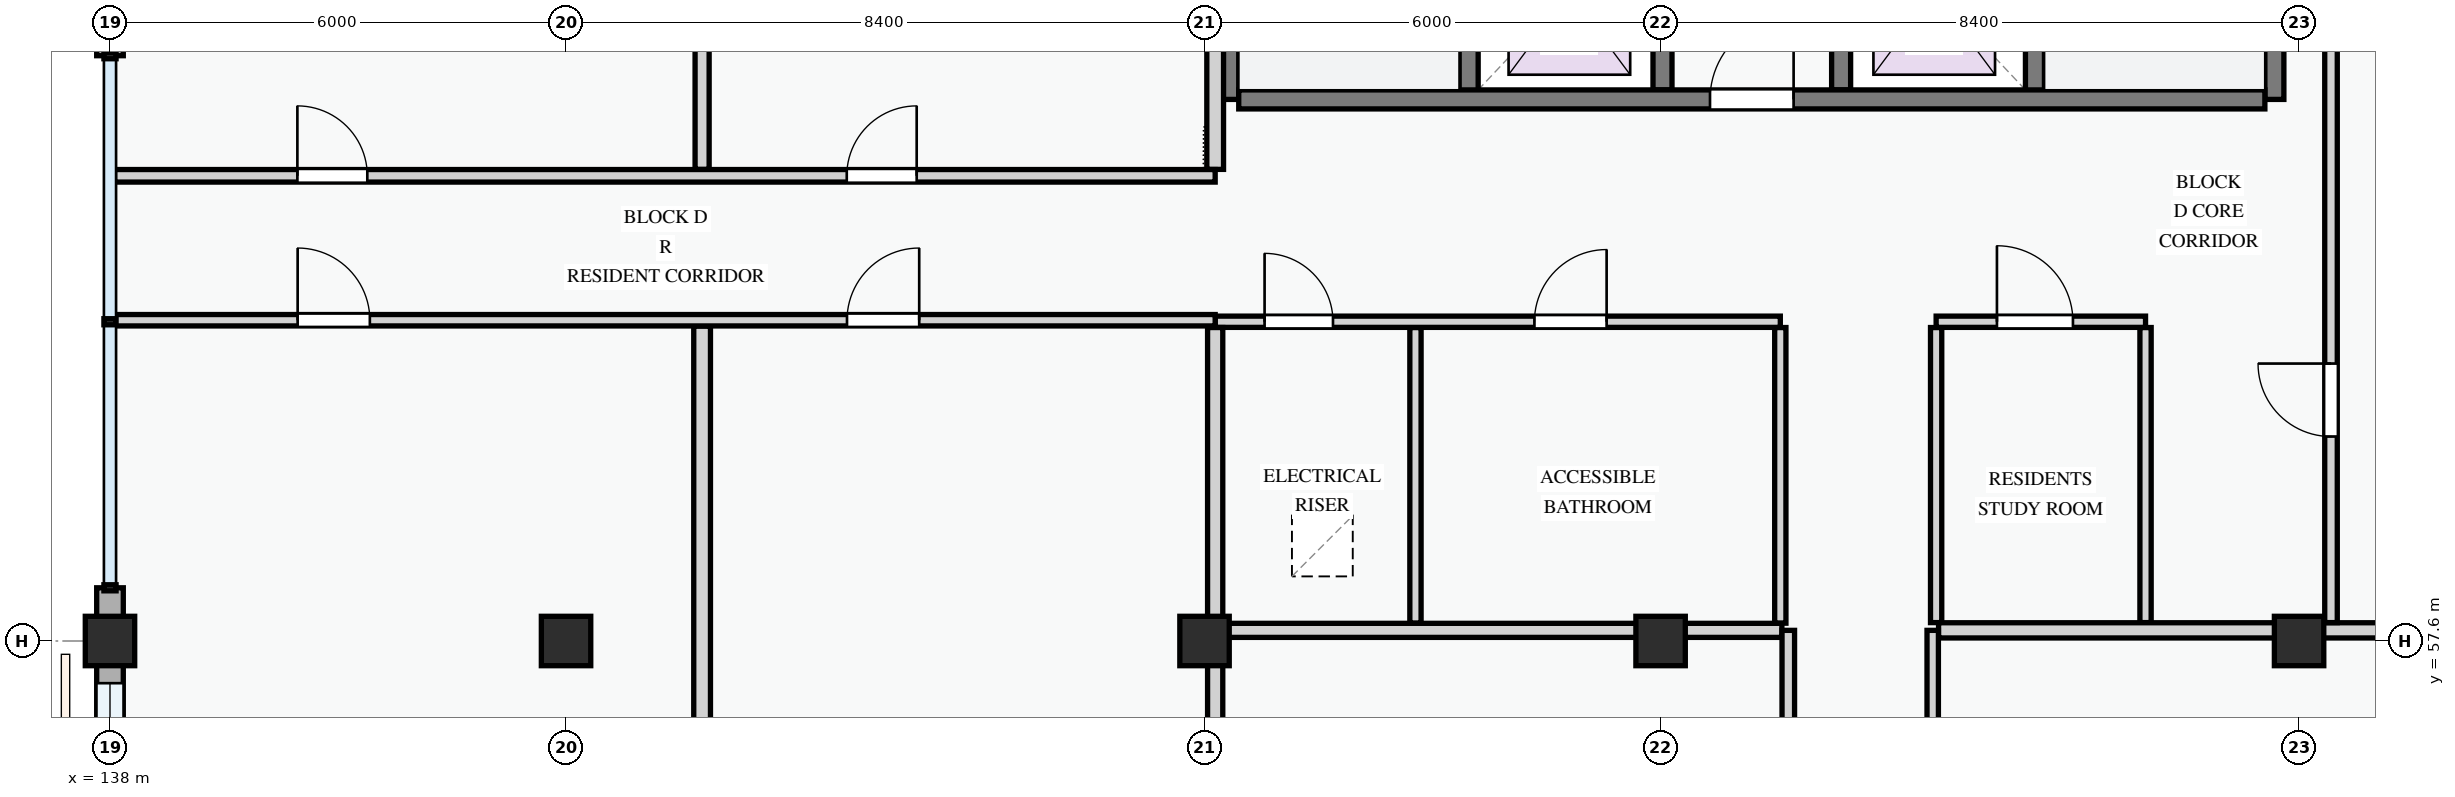
"""IFC4 building model, lengths in metres.
Left out: names, types, materials, properties, quantities, classifications, styles, units other than length and angle.
Written with IfcOpenShell. Run it as: python <this file> out.ifc"""

import sys

from ifc_helpers import new_model, si_unit, direction, frame, frame_2d, origin, origin_2d, place, context, subcontext, project, spatial, rectangle, extrude, element, fill, save


model = new_model("IFC4")
c1 = context("Model", 3, precision=1e-05, world=origin(), true_north=direction((0.0, 1.0)))
c2 = subcontext(c1, "Body", "Model", "MODEL_VIEW")
j1 = project(units=[si_unit("LENGTHUNIT", "METRE"), si_unit("PLANEANGLEUNIT", "RADIAN")], contexts=[c1])
p1 = place(None, origin())
s1 = spatial("IfcSite", under=j1, at=p1, CompositionType="ELEMENT")
p2 = place(p1, origin())
s2 = spatial("IfcBuilding", under=s1, at=p2, CompositionType="ELEMENT")
p3 = place(p2, frame((0.0, 0.0, 4.5)))
s3 = spatial("IfcBuildingStorey", under=s2, at=p3, CompositionType="ELEMENT", Elevation=4.5)
for number, where, z_axis, x_axis in (
    (1, (138.0, 57.6, 0.0), (0.0, 0.0, 1.0), (1.0, 0.0, 0.0)),
    (2, (144.0, 57.6, 0.0), (0.0, 0.0, 1.0), (1.0, 0.0, 0.0)),
    (3, (152.4, 57.6, 0.0), (0.0, 0.0, 1.0), (1.0, 0.0, 0.0)),
    (4, (158.4, 57.6, 0.0), (0.0, 0.0, 1.0), (1.0, 0.0, 0.0)),
    (5, (166.8, 57.6, 0.0), (0.0, 0.0, 1.0), (1.0, 0.0, 0.0)),
):
    element("IfcColumn", number, at=place(p3, frame(where, z_axis=z_axis, x_axis=x_axis)), inside=s3, PredefinedType="COLUMN", context=c2, shape_type="SweptSolid", body=[
        extrude(rectangle(XDim=0.65, YDim=0.65, at=origin_2d()), origin(), (0.0, 0.0, 1.0), 3.6),
    ])
for number, where, z_axis, x_axis in (
    (6, (138.0, 66.0, 0.0), (0.0, 0.0, 1.0), (0.0, -1.0, 0.0)),
    (7, (138.0, 58.3, 0.0), (0.0, 0.0, 1.0), (0.0, -1.0, 0.0)),
):
    element("IfcWall", number, at=place(p3, frame(where, z_axis=z_axis, x_axis=x_axis)), inside=s3, PredefinedType="STANDARD", context=c2, shape_type="SweptSolid", body=[
        extrude(rectangle(XDim=0.7, YDim=0.35, at=frame_2d((0.35, 0.0))), origin(), (0.0, 0.0, 1.0), 2.725),
    ])
p4 = place(p3, frame((138.0, 57.6, 0.0), z_axis=(0.0, 0.0, 1.0), x_axis=(0.0, -1.0, 0.0)))
e8 = element("IfcWall", 8, at=p4, inside=s3, PredefinedType="STANDARD", context=c2, shape_type="SweptSolid", body=[
    extrude(rectangle(XDim=6.0, YDim=0.35, at=frame_2d((3.0, 0.0))), origin(), (0.0, 0.0, 1.0), 2.875),
])
p5 = place(p4, frame((0.555, 0.0, 0.78)))
e9 = element("IfcOpeningElement", 9, at=p5, cuts=e8, PredefinedType="OPENING", context=c2, shape_type="SweptSolid", body=[
    extrude(rectangle(XDim=2.15, YDim=1.65, at=frame_2d((1.075, 0.825))), frame((0.0, 0.185, 0.0), z_axis=(0.0, -1.0, 0.0), x_axis=(1.0, 0.0, 0.0)), (0.0, 0.0, 1.0), 0.37),
])
p6 = place(p4, frame((3.795, 0.0, 0.78)))
e10 = element("IfcOpeningElement", 10, at=p6, cuts=e8, PredefinedType="OPENING", context=c2, shape_type="SweptSolid", body=[
    extrude(rectangle(XDim=1.15, YDim=1.25, at=frame_2d((0.575, 0.625))), frame((0.0, 0.185, 0.0), z_axis=(0.0, -1.0, 0.0), x_axis=(1.0, 0.0, 0.0)), (0.0, 0.0, 1.0), 0.37),
])
p7 = place(p3, frame((155.875, 71.65, 0.0), z_axis=(0.0, 0.0, 1.0), x_axis=(0.0, -1.0, 0.0)))
e11 = element("IfcWall", 11, at=p7, inside=s3, PredefinedType="SHEAR", context=c2, shape_type="SweptSolid", body=[
    extrude(rectangle(XDim=6.925, YDim=0.25, at=frame_2d((3.462, 0.0))), origin(), (0.0, 0.0, 1.0), 3.3),
])
p8 = place(p7, frame((0.35, 0.0, 0.0)))
e12 = element("IfcOpeningElement", 12, at=p8, cuts=e11, PredefinedType="OPENING", context=c2, shape_type="SweptSolid", body=[
    extrude(rectangle(XDim=0.95, YDim=2.1, at=frame_2d((0.475, 1.05))), frame((0.0, 0.135, 0.0), z_axis=(0.0, -1.0, 0.0), x_axis=(1.0, 0.0, 0.0)), (0.0, 0.0, 1.0), 0.27),
])
p9 = place(p3, frame((152.725, 71.8, 0.0), z_axis=(0.0, 0.0, 1.0), x_axis=(0.0, -1.0, 0.0)))
e13 = element("IfcWall", 13, at=p9, inside=s3, PredefinedType="SHEAR", context=c2, shape_type="SweptSolid", body=[
    extrude(rectangle(XDim=7.075, YDim=0.25, at=frame_2d((3.538, 0.0))), origin(), (0.0, 0.0, 1.0), 3.3),
])
p10 = place(p3, frame((166.475, 71.65, 0.0), z_axis=(0.0, 0.0, 1.0), x_axis=(0.0, -1.0, 0.0)))
e14 = element("IfcWall", 14, at=p10, inside=s3, PredefinedType="SHEAR", context=c2, shape_type="SweptSolid", body=[
    extrude(rectangle(XDim=6.925, YDim=0.25, at=frame_2d((3.462, 0.0))), origin(), (0.0, 0.0, 1.0), 3.3),
])
p11 = place(p3, frame((163.325, 71.65, 0.0), z_axis=(0.0, 0.0, 1.0), x_axis=(0.0, -1.0, 0.0)))
e15 = element("IfcWall", 15, at=p11, inside=s3, PredefinedType="SHEAR", context=c2, shape_type="SweptSolid", body=[
    extrude(rectangle(XDim=6.925, YDim=0.25, at=frame_2d((3.462, 0.0))), origin(), (0.0, 0.0, 1.0), 3.3),
])
p12 = place(p11, frame((0.35, 0.0, 0.0)))
e16 = element("IfcOpeningElement", 16, at=p12, cuts=e15, PredefinedType="OPENING", context=c2, shape_type="SweptSolid", body=[
    extrude(rectangle(XDim=0.95, YDim=2.1, at=frame_2d((0.475, 1.05))), frame((0.0, 0.135, 0.0), z_axis=(0.0, -1.0, 0.0), x_axis=(1.0, 0.0, 0.0)), (0.0, 0.0, 1.0), 0.27),
])
for number, where, z_axis, x_axis in (
    (17, (158.425, 67.275, 0.0), (0.0, 0.0, 1.0), (0.0, -1.0, 0.0)),
    (18, (160.775, 67.275, 0.0), (0.0, 0.0, 1.0), (0.0, -1.0, 0.0)),
):
    element("IfcWall", number, at=place(p3, frame(where, z_axis=z_axis, x_axis=x_axis)), inside=s3, PredefinedType="SHEAR", context=c2, shape_type="SweptSolid", body=[
        extrude(rectangle(XDim=2.425, YDim=0.25, at=frame_2d((1.212, 0.0))), origin(), (0.0, 0.0, 1.0), 3.3),
    ])
p13 = place(p3, frame((152.85, 64.725, 0.0), z_axis=(0.0, 0.0, 1.0), x_axis=(1.0, 0.0, 0.0)))
e19 = element("IfcWall", 19, at=p13, inside=s3, PredefinedType="SHEAR", context=c2, shape_type="SweptSolid", body=[
    extrude(rectangle(XDim=13.5, YDim=0.25, at=frame_2d((6.75, 0.0))), origin(), (0.0, 0.0, 1.0), 3.3),
])
p14 = place(p13, frame((6.2, 0.0, 0.0)))
e20 = element("IfcOpeningElement", 20, at=p14, cuts=e19, PredefinedType="OPENING", context=c2, shape_type="SweptSolid", body=[
    extrude(rectangle(XDim=1.1, YDim=2.15, at=frame_2d((0.55, 1.075))), frame((0.0, 0.135, 0.0), z_axis=(0.0, -1.0, 0.0), x_axis=(1.0, 0.0, 0.0)), (0.0, 0.0, 1.0), 0.27),
])
for number, where, z_axis, x_axis in (
    (21, (155.175, 61.724, 0.0), (0.0, 0.0, 1.0), (0.0, -1.0, 0.0)),
    (22, (159.975, 61.724, 0.0), (0.0, 0.0, 1.0), (0.0, -1.0, 0.0)),
):
    element("IfcWall", number, at=place(p3, frame(where, z_axis=z_axis, x_axis=x_axis)), inside=s3, PredefinedType="PARTITIONING", context=c2, shape_type="SweptSolid", body=[
        extrude(rectangle(XDim=3.89, YDim=0.148, at=frame_2d((1.945, 0.0))), origin(), (0.0, 0.0, 1.0), 3.3),
    ])
for number, where, z_axis, x_axis in (
    (23, (162.025, 61.724, 0.0), (0.0, 0.0, 1.0), (0.0, -1.0, 0.0)),
    (24, (164.78, 61.724, 0.0), (0.0, 0.0, 1.0), (0.0, -1.0, 0.0)),
):
    element("IfcWall", number, at=place(p3, frame(where, z_axis=z_axis, x_axis=x_axis)), inside=s3, PredefinedType="PARTITIONING", context=c2, shape_type="SweptSolid", body=[
        extrude(rectangle(XDim=3.882, YDim=0.148, at=frame_2d((1.941, 0.0))), origin(), (0.0, 0.0, 1.0), 3.3),
    ])
p15 = place(p3, frame((152.54, 61.8, 0.0), z_axis=(0.0, 0.0, 1.0), x_axis=(1.0, 0.0, 0.0)))
e25 = element("IfcWall", 25, at=p15, inside=s3, PredefinedType="PARTITIONING", context=c2, shape_type="SweptSolid", body=[
    extrude(rectangle(XDim=7.435, YDim=0.148, at=frame_2d((3.718, 0.0))), origin(), (0.0, 0.0, 1.0), 3.3),
])
p16 = place(p15, frame((0.65, 0.0, 0.0)))
e26 = element("IfcOpeningElement", 26, at=p16, cuts=e25, PredefinedType="OPENING", context=c2, shape_type="SweptSolid", body=[
    extrude(rectangle(XDim=0.9, YDim=2.1, at=frame_2d((0.45, 1.05))), frame((0.0, 0.084, 0.0), z_axis=(0.0, -1.0, 0.0), x_axis=(1.0, 0.0, 0.0)), (0.0, 0.0, 1.0), 0.168),
])
p17 = place(p15, frame((4.2, 0.0, 0.0)))
e27 = element("IfcOpeningElement", 27, at=p17, cuts=e25, PredefinedType="OPENING", context=c2, shape_type="SweptSolid", body=[
    extrude(rectangle(XDim=0.95, YDim=2.1, at=frame_2d((0.475, 1.05))), frame((0.0, 0.084, 0.0), z_axis=(0.0, -1.0, 0.0), x_axis=(1.0, 0.0, 0.0)), (0.0, 0.0, 1.0), 0.168),
])
p18 = place(p3, frame((162.025, 61.8, 0.0), z_axis=(0.0, 0.0, 1.0), x_axis=(1.0, 0.0, 0.0)))
e28 = element("IfcWall", 28, at=p18, inside=s3, PredefinedType="PARTITIONING", context=c2, shape_type="SweptSolid", body=[
    extrude(rectangle(XDim=2.755, YDim=0.148, at=frame_2d((1.377, 0.0))), origin(), (0.0, 0.0, 1.0), 3.3),
])
p19 = place(p18, frame((0.8, 0.0, 0.0)))
e29 = element("IfcOpeningElement", 29, at=p19, cuts=e28, PredefinedType="OPENING", context=c2, shape_type="SweptSolid", body=[
    extrude(rectangle(XDim=1.0, YDim=2.15, at=frame_2d((0.5, 1.075))), frame((0.0, 0.084, 0.0), z_axis=(0.0, -1.0, 0.0), x_axis=(1.0, 0.0, 0.0)), (0.0, 0.0, 1.0), 0.168),
])
p20 = place(p3, frame((152.642, 57.74, 0.0), z_axis=(0.0, 0.0, 1.0), x_axis=(1.0, 0.0, 0.0)))
e30 = element("IfcWall", 30, at=p20, inside=s3, PredefinedType="PARTITIONING", context=c2, shape_type="SweptSolid", body=[
    extrude(rectangle(XDim=7.354, YDim=0.185, at=frame_2d((3.677, 0.0))), origin(), (0.0, 0.0, 1.0), 2.675),
])
p21 = place(p3, frame((162.057, 57.74, 0.0), z_axis=(0.0, 0.0, 1.0), x_axis=(1.0, 0.0, 0.0)))
e31 = element("IfcWall", 31, at=p21, inside=s3, PredefinedType="PARTITIONING", context=c2, shape_type="SweptSolid", body=[
    extrude(rectangle(XDim=11.766, YDim=0.2, at=frame_2d((5.883, 0.0))), origin(), (0.0, 0.0, 1.0), 2.675),
])
p22 = place(p3, frame((160.08, 37.26, 0.0), z_axis=(0.0, 0.0, 1.0), x_axis=(0.0, 1.0, 0.0)))
e32 = element("IfcWall", 32, at=p22, inside=s3, PredefinedType="PARTITIONING", context=c2, shape_type="SweptSolid", body=[
    extrude(rectangle(XDim=20.48, YDim=0.165, at=frame_2d((10.24, 0.0))), origin(), (0.0, 0.0, 1.0), 3.3),
])
p23 = place(p22, frame((9.45, 0.0, 0.0)))
e33 = element("IfcOpeningElement", 33, at=p23, cuts=e32, PredefinedType="OPENING", context=c2, shape_type="SweptSolid", body=[
    extrude(rectangle(XDim=0.95, YDim=2.1, at=frame_2d((0.475, 1.05))), frame((0.0, 0.093, 0.0), z_axis=(0.0, -1.0, 0.0), x_axis=(1.0, 0.0, 0.0)), (0.0, 0.0, 1.0), 0.185),
])
p24 = place(p22, frame((10.9, 0.0, 0.0)))
e34 = element("IfcOpeningElement", 34, at=p24, cuts=e32, PredefinedType="OPENING", context=c2, shape_type="SweptSolid", body=[
    extrude(rectangle(XDim=0.95, YDim=2.1, at=frame_2d((0.475, 1.05))), frame((0.0, 0.093, 0.0), z_axis=(0.0, -1.0, 0.0), x_axis=(1.0, 0.0, 0.0)), (0.0, 0.0, 1.0), 0.185),
])
p25 = place(p3, frame((161.98, 37.26, 0.0), z_axis=(0.0, 0.0, 1.0), x_axis=(0.0, 1.0, 0.0)))
e35 = element("IfcWall", 35, at=p25, inside=s3, PredefinedType="PARTITIONING", context=c2, shape_type="SweptSolid", body=[
    extrude(rectangle(XDim=20.48, YDim=0.15, at=frame_2d((10.24, 0.0))), origin(), (0.0, 0.0, 1.0), 3.3),
])
p26 = place(p25, frame((9.44, 0.0, 0.0)))
e36 = element("IfcOpeningElement", 36, at=p26, cuts=e35, PredefinedType="OPENING", context=c2, shape_type="SweptSolid", body=[
    extrude(rectangle(XDim=0.92, YDim=2.1, at=frame_2d((0.46, 1.05))), frame((0.0, 0.085, 0.0), z_axis=(0.0, -1.0, 0.0), x_axis=(1.0, 0.0, 0.0)), (0.0, 0.0, 1.0), 0.17),
])
p27 = place(p25, frame((10.9, 0.0, 0.0)))
e37 = element("IfcOpeningElement", 37, at=p27, cuts=e35, PredefinedType="OPENING", context=c2, shape_type="SweptSolid", body=[
    extrude(rectangle(XDim=0.92, YDim=2.1, at=frame_2d((0.46, 1.05))), frame((0.0, 0.085, 0.0), z_axis=(0.0, -1.0, 0.0), x_axis=(1.0, 0.0, 0.0)), (0.0, 0.0, 1.0), 0.17),
])
p28 = place(p3, frame((167.22, 57.842, 0.0), z_axis=(0.0, 0.0, 1.0), x_axis=(0.0, 1.0, 0.0)))
e38 = element("IfcWall", 38, at=p28, inside=s3, PredefinedType="PARTITIONING", context=c2, shape_type="SweptSolid", body=[
    extrude(rectangle(XDim=13.981, YDim=0.165, at=frame_2d((6.99, 0.0))), origin(), (0.0, 0.0, 1.0), 2.725),
])
p29 = place(p28, frame((2.448, 0.0, 0.0)))
e39 = element("IfcOpeningElement", 39, at=p29, cuts=e38, PredefinedType="OPENING", context=c2, shape_type="SweptSolid", body=[
    extrude(rectangle(XDim=0.96, YDim=2.12, at=frame_2d((0.48, 1.06))), frame((0.0, 0.093, 0.0), z_axis=(0.0, -1.0, 0.0), x_axis=(1.0, 0.0, 0.0)), (0.0, 0.0, 1.0), 0.185),
])
p30 = place(p3, frame((145.79, 43.26, 0.0), z_axis=(0.0, 0.0, 1.0), x_axis=(0.0, 1.0, 0.0)))
e40 = element("IfcWall", 40, at=p30, inside=s3, PredefinedType="PARTITIONING", context=c2, shape_type="SweptSolid", body=[
    extrude(rectangle(XDim=18.483, YDim=0.22, at=frame_2d((9.241, 0.0))), origin(), (0.0, 0.0, 1.0), 3.3),
])
p31 = place(p3, frame((145.79, 63.804, 0.0), z_axis=(0.0, 0.0, 1.0), x_axis=(0.0, 1.0, 0.0)))
e41 = element("IfcWall", 41, at=p31, inside=s3, PredefinedType="PARTITIONING", context=c2, shape_type="SweptSolid", body=[
    extrude(rectangle(XDim=8.019, YDim=0.185, at=frame_2d((4.009, 0.0))), origin(), (0.0, 0.0, 1.0), 3.3),
])
p32 = place(p3, frame((152.54, 43.26, 0.0), z_axis=(0.0, 0.0, 1.0), x_axis=(0.0, 1.0, 0.0)))
e42 = element("IfcWall", 42, at=p32, inside=s3, PredefinedType="PARTITIONING", context=c2, shape_type="SweptSolid", body=[
    extrude(rectangle(XDim=18.464, YDim=0.2, at=frame_2d((9.232, 0.0))), origin(), (0.0, 0.0, 1.0), 2.725),
])
p33 = place(p3, frame((152.54, 63.804, 0.0), z_axis=(0.0, 0.0, 1.0), x_axis=(0.0, 1.0, 0.0)))
e43 = element("IfcWall", 43, at=p33, inside=s3, PredefinedType="PARTITIONING", context=c2, shape_type="SweptSolid", body=[
    extrude(rectangle(XDim=8.019, YDim=0.22, at=frame_2d((4.009, 0.0))), origin(), (0.0, 0.0, 1.0), 2.725),
])
p34 = place(p3, frame((138.06, 61.82, 0.0), z_axis=(0.0, 0.0, 1.0), x_axis=(1.0, 0.0, 0.0)))
e44 = element("IfcWall", 44, at=p34, inside=s3, PredefinedType="PARTITIONING", context=c2, shape_type="SweptSolid", body=[
    extrude(rectangle(XDim=14.48, YDim=0.15, at=frame_2d((7.24, 0.0))), origin(), (0.0, 0.0, 1.0), 3.3),
])
p35 = place(p34, frame((2.409, 0.0, 0.0)))
e45 = element("IfcOpeningElement", 45, at=p35, cuts=e44, PredefinedType="OPENING", context=c2, shape_type="SweptSolid", body=[
    extrude(rectangle(XDim=0.95, YDim=2.1, at=frame_2d((0.475, 1.05))), frame((0.0, 0.085, 0.0), z_axis=(0.0, -1.0, 0.0), x_axis=(1.0, 0.0, 0.0)), (0.0, 0.0, 1.0), 0.17),
])
p36 = place(p34, frame((9.636, 0.0, 0.0)))
e46 = element("IfcOpeningElement", 46, at=p36, cuts=e44, PredefinedType="OPENING", context=c2, shape_type="SweptSolid", body=[
    extrude(rectangle(XDim=0.95, YDim=2.1, at=frame_2d((0.475, 1.05))), frame((0.0, 0.085, 0.0), z_axis=(0.0, -1.0, 0.0), x_axis=(1.0, 0.0, 0.0)), (0.0, 0.0, 1.0), 0.17),
])
p37 = place(p3, frame((138.06, 63.72, 0.0), z_axis=(0.0, 0.0, 1.0), x_axis=(1.0, 0.0, 0.0)))
e47 = element("IfcWall", 47, at=p37, inside=s3, PredefinedType="PARTITIONING", context=c2, shape_type="SweptSolid", body=[
    extrude(rectangle(XDim=14.48, YDim=0.165, at=frame_2d((7.24, 0.0))), origin(), (0.0, 0.0, 1.0), 3.3),
])
p38 = place(p37, frame((2.405, 0.0, 0.0)))
e48 = element("IfcOpeningElement", 48, at=p38, cuts=e47, PredefinedType="OPENING", context=c2, shape_type="SweptSolid", body=[
    extrude(rectangle(XDim=0.92, YDim=2.1, at=frame_2d((0.46, 1.05))), frame((0.0, 0.093, 0.0), z_axis=(0.0, -1.0, 0.0), x_axis=(1.0, 0.0, 0.0)), (0.0, 0.0, 1.0), 0.185),
])
p39 = place(p37, frame((9.633, 0.0, 0.0)))
e49 = element("IfcOpeningElement", 49, at=p39, cuts=e47, PredefinedType="OPENING", context=c2, shape_type="SweptSolid", body=[
    extrude(rectangle(XDim=0.92, YDim=2.1, at=frame_2d((0.46, 1.05))), frame((0.0, 0.093, 0.0), z_axis=(0.0, -1.0, 0.0), x_axis=(1.0, 0.0, 0.0)), (0.0, 0.0, 1.0), 0.185),
])
p40 = place(p5, origin())
e50 = element("IfcWindow", 50, at=p40, inside=s3, PartitioningType="DOUBLE_PANEL_VERTICAL", PredefinedType="WINDOW", context=c2, shape_type="SweptSolid", body=[
    extrude(rectangle(XDim=2.15, YDim=1.65, at=frame_2d((1.075, 0.825))), frame((0.0, 0.03, 0.0), z_axis=(0.0, -1.0, 0.0), x_axis=(1.0, 0.0, 0.0)), (0.0, 0.0, 1.0), 0.06),
])
fill(e9, e50)
p41 = place(p14, origin())
e51 = element("IfcDoor", 51, at=p41, inside=s3, OperationType="SINGLE_SWING_RIGHT", PredefinedType="DOOR", context=c2, shape_type="SweptSolid", body=[
    extrude(rectangle(XDim=1.1, YDim=2.15, at=frame_2d((0.55, 1.075))), frame((0.0, 0.025, 0.0), z_axis=(0.0, -1.0, 0.0), x_axis=(1.0, 0.0, 0.0)), (0.0, 0.0, 1.0), 0.05),
])
fill(e20, e51)
p42 = place(p16, origin())
e52 = element("IfcDoor", 52, at=p42, inside=s3, OperationType="SINGLE_SWING_LEFT", PredefinedType="DOOR", context=c2, shape_type="SweptSolid", body=[
    extrude(rectangle(XDim=0.9, YDim=2.1, at=frame_2d((0.45, 1.05))), frame((0.0, 0.025, 0.0), z_axis=(0.0, -1.0, 0.0), x_axis=(1.0, 0.0, 0.0)), (0.0, 0.0, 1.0), 0.05),
])
fill(e26, e52)
p43 = place(p17, origin())
e53 = element("IfcDoor", 53, at=p43, inside=s3, OperationType="SINGLE_SWING_RIGHT", PredefinedType="DOOR", context=c2, shape_type="SweptSolid", body=[
    extrude(rectangle(XDim=0.95, YDim=2.1, at=frame_2d((0.475, 1.05))), frame((0.0, 0.025, 0.0), z_axis=(0.0, -1.0, 0.0), x_axis=(1.0, 0.0, 0.0)), (0.0, 0.0, 1.0), 0.05),
])
fill(e27, e53)
p44 = place(p19, origin())
e54 = element("IfcDoor", 54, at=p44, inside=s3, OperationType="SINGLE_SWING_LEFT", PredefinedType="DOOR", context=c2, shape_type="SweptSolid", body=[
    extrude(rectangle(XDim=1.0, YDim=2.15, at=frame_2d((0.5, 1.075))), frame((0.0, 0.025, 0.0), z_axis=(0.0, -1.0, 0.0), x_axis=(1.0, 0.0, 0.0)), (0.0, 0.0, 1.0), 0.05),
])
fill(e29, e54)
p45 = place(p29, origin())
e55 = element("IfcDoor", 55, at=p45, inside=s3, OperationType="SINGLE_SWING_RIGHT", PredefinedType="DOOR", context=c2, shape_type="SweptSolid", body=[
    extrude(rectangle(XDim=0.96, YDim=2.12, at=frame_2d((0.48, 1.06))), frame((0.0, 0.025, 0.0), z_axis=(0.0, -1.0, 0.0), x_axis=(1.0, 0.0, 0.0)), (0.0, 0.0, 1.0), 0.05),
])
fill(e39, e55)
p46 = place(p35, origin())
e56 = element("IfcDoor", 56, at=p46, inside=s3, OperationType="SINGLE_SWING_LEFT", PredefinedType="DOOR", context=c2, shape_type="SweptSolid", body=[
    extrude(rectangle(XDim=0.95, YDim=2.1, at=frame_2d((0.475, 1.05))), frame((0.0, 0.025, 0.0), z_axis=(0.0, -1.0, 0.0), x_axis=(1.0, 0.0, 0.0)), (0.0, 0.0, 1.0), 0.05),
])
fill(e45, e56)
p47 = place(p36, origin())
e57 = element("IfcDoor", 57, at=p47, inside=s3, OperationType="SINGLE_SWING_RIGHT", PredefinedType="DOOR", context=c2, shape_type="SweptSolid", body=[
    extrude(rectangle(XDim=0.95, YDim=2.1, at=frame_2d((0.475, 1.05))), frame((0.0, 0.025, 0.0), z_axis=(0.0, -1.0, 0.0), x_axis=(1.0, 0.0, 0.0)), (0.0, 0.0, 1.0), 0.05),
])
fill(e46, e57)
p48 = place(p38, origin())
e58 = element("IfcDoor", 58, at=p48, inside=s3, OperationType="SINGLE_SWING_LEFT", PredefinedType="DOOR", context=c2, shape_type="SweptSolid", body=[
    extrude(rectangle(XDim=0.92, YDim=2.1, at=frame_2d((0.46, 1.05))), frame((0.0, 0.025, 0.0), z_axis=(0.0, -1.0, 0.0), x_axis=(1.0, 0.0, 0.0)), (0.0, 0.0, 1.0), 0.05),
])
fill(e48, e58)
p49 = place(p39, origin())
e59 = element("IfcDoor", 59, at=p49, inside=s3, OperationType="SINGLE_SWING_RIGHT", PredefinedType="DOOR", context=c2, shape_type="SweptSolid", body=[
    extrude(rectangle(XDim=0.92, YDim=2.1, at=frame_2d((0.46, 1.05))), frame((0.0, 0.025, 0.0), z_axis=(0.0, -1.0, 0.0), x_axis=(1.0, 0.0, 0.0)), (0.0, 0.0, 1.0), 0.05),
])
fill(e49, e59)
save(model, sys.argv[1])
